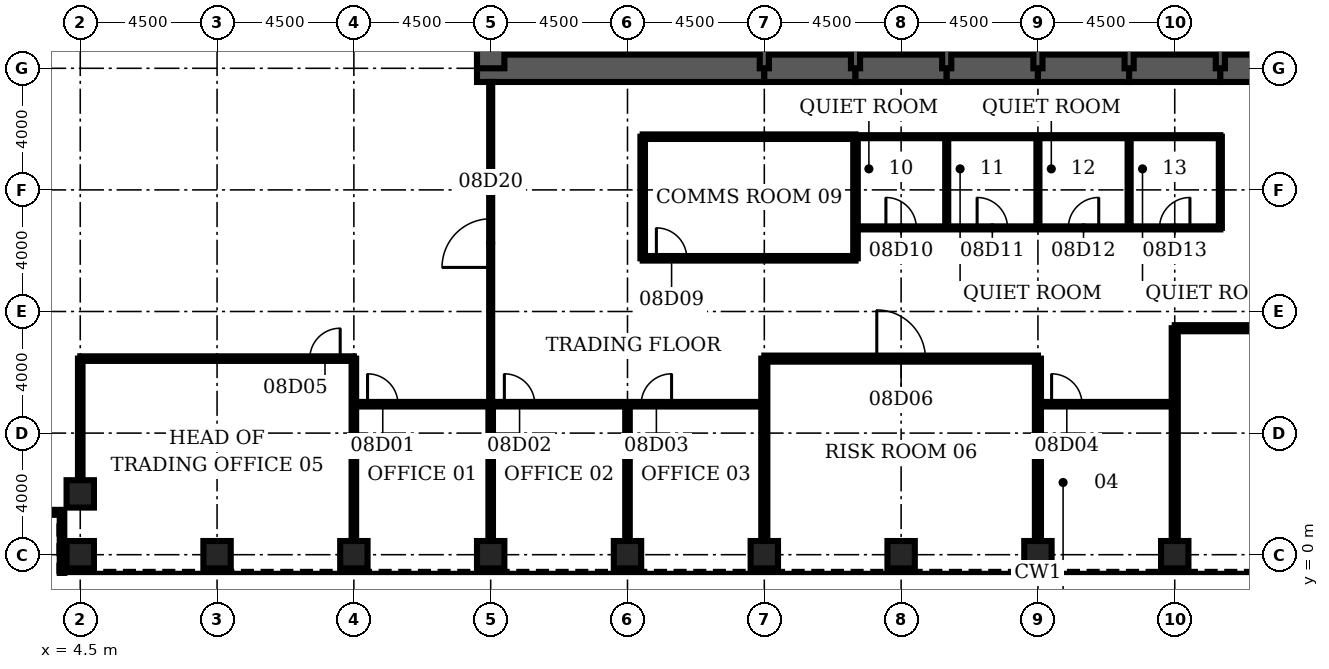
"""IFC4 building model, lengths in metres.
Left out: names, types, materials, properties, quantities, classifications, styles, units other than length and angle.
Written with IfcOpenShell. Run it as: python <this file> out.ifc"""

import sys

from ifc_helpers import new_model, si_unit, direction, frame, frame_2d, origin, origin_2d, place, context, subcontext, project, spatial, rectangle, hollow_rectangle, extrude, element, fill, save


model = new_model("IFC4")
c1 = context("Model", 3, precision=1e-05, world=origin(), true_north=direction((0.0, 1.0)))
c2 = subcontext(c1, "Body", "Model", "MODEL_VIEW")
j1 = project(units=[si_unit("LENGTHUNIT", "METRE"), si_unit("PLANEANGLEUNIT", "RADIAN")], contexts=[c1])
p1 = place(None, origin())
s1 = spatial("IfcSite", under=j1, at=p1, CompositionType="ELEMENT")
p2 = place(p1, origin())
s2 = spatial("IfcBuilding", under=s1, at=p2, CompositionType="ELEMENT")
p3 = place(p2, frame((0.0, 0.0, 41.0)))
s3 = spatial("IfcBuildingStorey", under=s2, at=p3, CompositionType="ELEMENT", Elevation=41.0)
for number, where, z_axis, x_axis in (
    (1, (4.5, 0.0, 0.0), (0.0, 0.0, 1.0), (0.0, 1.0, 0.0)),
    (2, (9.0, 0.0, 0.0), (0.0, 0.0, 1.0), (0.0, 1.0, 0.0)),
    (3, (13.5, 0.0, 0.0), (0.0, 0.0, 1.0), (0.0, 1.0, 0.0)),
    (4, (18.0, 0.0, 0.0), (0.0, 0.0, 1.0), (0.0, 1.0, 0.0)),
    (5, (22.5, 0.0, 0.0), (0.0, 0.0, 1.0), (0.0, 1.0, 0.0)),
    (6, (27.0, 0.0, 0.0), (0.0, 0.0, 1.0), (0.0, 1.0, 0.0)),
    (7, (31.5, 0.0, 0.0), (0.0, 0.0, 1.0), (0.0, 1.0, 0.0)),
    (8, (36.0, 0.0, 0.0), (0.0, 0.0, 1.0), (0.0, 1.0, 0.0)),
    (9, (40.5, 0.0, 0.0), (0.0, 0.0, 1.0), (0.0, 1.0, 0.0)),
    (10, (4.5, 2.0, 0.0), (0.0, 0.0, 1.0), (0.0, 1.0, 0.0)),
):
    element("IfcColumn", number, at=place(p3, frame(where, z_axis=z_axis, x_axis=x_axis)), inside=s3, PredefinedType="COLUMN", context=c2, shape_type="SweptSolid", body=[
        extrude(hollow_rectangle(XDim=0.9, YDim=0.9, WallThickness=0.12, at=origin_2d()), origin(), (0.0, 0.0, 1.0), 4.5),
    ])
p4 = place(p3, frame((17.55, 16.0, 0.0), z_axis=(0.0, 0.0, 1.0), x_axis=(1.0, 0.0, 0.0)))
e11 = element("IfcWall", 11, at=p4, inside=s3, PredefinedType="SHEAR", context=c2, shape_type="SweptSolid", body=[
    extrude(rectangle(XDim=9.45, YDim=0.9, at=frame_2d((4.725, 0.0))), origin(), (0.0, 0.0, 1.0), 4.5),
])
for number, where, z_axis, x_axis in (
    (12, (27.0, 16.0, 0.0), (0.0, 0.0, 1.0), (1.0, 0.0, 0.0)),
    (13, (30.0, 16.0, 0.0), (0.0, 0.0, 1.0), (1.0, 0.0, 0.0)),
    (14, (33.0, 16.0, 0.0), (0.0, 0.0, 1.0), (1.0, 0.0, 0.0)),
    (15, (36.0, 16.0, 0.0), (0.0, 0.0, 1.0), (1.0, 0.0, 0.0)),
    (16, (39.0, 16.0, 0.0), (0.0, 0.0, 1.0), (1.0, 0.0, 0.0)),
    (17, (42.0, 16.0, 0.0), (0.0, 0.0, 1.0), (1.0, 0.0, 0.0)),
):
    element("IfcWall", number, at=place(p3, frame(where, z_axis=z_axis, x_axis=x_axis)), inside=s3, PredefinedType="SHEAR", context=c2, shape_type="SweptSolid", body=[
        extrude(rectangle(XDim=3.0, YDim=0.9, at=frame_2d((1.5, 0.0))), origin(), (0.0, 0.0, 1.0), 4.5),
    ])
p5 = place(p3, frame((18.0, 19.2, 0.0), z_axis=(0.0, 0.0, 1.0), x_axis=(0.0, -1.0, 0.0)))
e18 = element("IfcWall", 18, at=p5, inside=s3, PredefinedType="SHEAR", context=c2, shape_type="SweptSolid", body=[
    extrude(rectangle(XDim=3.2, YDim=0.9, at=frame_2d((1.6, 0.0))), origin(), (0.0, 0.0, 1.0), 4.5),
])
for number, where, z_axis, x_axis in (
    (19, (27.0, 16.0, 0.0), (0.0, 0.0, 1.0), (0.0, 1.0, 0.0)),
    (20, (30.0, 16.0, 0.0), (0.0, 0.0, 1.0), (0.0, 1.0, 0.0)),
    (21, (33.0, 16.0, 0.0), (0.0, 0.0, 1.0), (0.0, 1.0, 0.0)),
    (22, (36.0, 16.0, 0.0), (0.0, 0.0, 1.0), (0.0, 1.0, 0.0)),
    (23, (39.0, 16.0, 0.0), (0.0, 0.0, 1.0), (0.0, 1.0, 0.0)),
    (24, (42.0, 16.0, 0.0), (0.0, 0.0, 1.0), (0.0, 1.0, 0.0)),
):
    element("IfcWall", number, at=place(p3, frame(where, z_axis=z_axis, x_axis=x_axis)), inside=s3, PredefinedType="SOLIDWALL", context=c2, shape_type="SweptSolid", body=[
        extrude(rectangle(XDim=3.2, YDim=0.3, at=frame_2d((1.6, 0.0))), origin(), (0.0, 0.0, 1.0), 4.5),
    ])
p6 = place(p3, frame((13.5, 4.95, 0.0), z_axis=(0.0, 0.0, 1.0), x_axis=(1.0, 0.0, 0.0)))
e25 = element("IfcWall", 25, at=p6, inside=s3, PredefinedType="PARTITIONING", context=c2, shape_type="SweptSolid", body=[
    extrude(rectangle(XDim=13.5, YDim=0.15, at=frame_2d((6.75, 0.0))), origin(), (0.0, 0.0, 1.0), 3.0),
])
p7 = place(p6, frame((0.45, 0.0, 0.0)))
e26 = element("IfcOpeningElement", 26, at=p7, cuts=e25, PredefinedType="OPENING", context=c2, shape_type="SweptSolid", body=[
    extrude(rectangle(XDim=1.0, YDim=2.1, at=frame_2d((0.5, 1.05))), frame((0.0, 0.085, 0.0), z_axis=(0.0, -1.0, 0.0), x_axis=(1.0, 0.0, 0.0)), (0.0, 0.0, 1.0), 0.17),
])
p8 = place(p6, frame((4.95, 0.0, 0.0)))
e27 = element("IfcOpeningElement", 27, at=p8, cuts=e25, PredefinedType="OPENING", context=c2, shape_type="SweptSolid", body=[
    extrude(rectangle(XDim=1.0, YDim=2.1, at=frame_2d((0.5, 1.05))), frame((0.0, 0.085, 0.0), z_axis=(0.0, -1.0, 0.0), x_axis=(1.0, 0.0, 0.0)), (0.0, 0.0, 1.0), 0.17),
])
p9 = place(p6, frame((9.45, 0.0, 0.0)))
e28 = element("IfcOpeningElement", 28, at=p9, cuts=e25, PredefinedType="OPENING", context=c2, shape_type="SweptSolid", body=[
    extrude(rectangle(XDim=1.0, YDim=2.1, at=frame_2d((0.5, 1.05))), frame((0.0, 0.085, 0.0), z_axis=(0.0, -1.0, 0.0), x_axis=(1.0, 0.0, 0.0)), (0.0, 0.0, 1.0), 0.17),
])
p10 = place(p3, frame((36.0, 4.95, 0.0), z_axis=(0.0, 0.0, 1.0), x_axis=(1.0, 0.0, 0.0)))
e29 = element("IfcWall", 29, at=p10, inside=s3, PredefinedType="PARTITIONING", context=c2, shape_type="SweptSolid", body=[
    extrude(rectangle(XDim=4.5, YDim=0.15, at=frame_2d((2.25, 0.0))), origin(), (0.0, 0.0, 1.0), 3.0),
])
p11 = place(p10, frame((0.45, 0.0, 0.0)))
e30 = element("IfcOpeningElement", 30, at=p11, cuts=e29, PredefinedType="OPENING", context=c2, shape_type="SweptSolid", body=[
    extrude(rectangle(XDim=1.0, YDim=2.1, at=frame_2d((0.5, 1.05))), frame((0.0, 0.085, 0.0), z_axis=(0.0, -1.0, 0.0), x_axis=(1.0, 0.0, 0.0)), (0.0, 0.0, 1.0), 0.17),
])
p12 = place(p3, frame((4.5, 6.45, 0.0), z_axis=(0.0, 0.0, 1.0), x_axis=(1.0, 0.0, 0.0)))
e31 = element("IfcWall", 31, at=p12, inside=s3, PredefinedType="PARTITIONING", context=c2, shape_type="SweptSolid", body=[
    extrude(rectangle(XDim=9.0, YDim=0.15, at=frame_2d((4.5, 0.0))), origin(), (0.0, 0.0, 1.0), 3.0),
])
p13 = place(p12, frame((7.55, 0.0, 0.0)))
e32 = element("IfcOpeningElement", 32, at=p13, cuts=e31, PredefinedType="OPENING", context=c2, shape_type="SweptSolid", body=[
    extrude(rectangle(XDim=1.0, YDim=2.1, at=frame_2d((0.5, 1.05))), frame((0.0, 0.085, 0.0), z_axis=(0.0, -1.0, 0.0), x_axis=(1.0, 0.0, 0.0)), (0.0, 0.0, 1.0), 0.17),
])
p14 = place(p3, frame((27.0, 6.45, 0.0), z_axis=(0.0, 0.0, 1.0), x_axis=(1.0, 0.0, 0.0)))
e33 = element("IfcWall", 33, at=p14, inside=s3, PredefinedType="PARTITIONING", context=c2, shape_type="SweptSolid", body=[
    extrude(rectangle(XDim=9.0, YDim=0.2, at=frame_2d((4.5, 0.0))), origin(), (0.0, 0.0, 1.0), 3.0),
])
p15 = place(p14, frame((3.7, 0.0, 0.0)))
e34 = element("IfcOpeningElement", 34, at=p15, cuts=e33, PredefinedType="OPENING", context=c2, shape_type="SweptSolid", body=[
    extrude(rectangle(XDim=1.6, YDim=2.1, at=frame_2d((0.8, 1.05))), frame((0.0, 0.11, 0.0), z_axis=(0.0, -1.0, 0.0), x_axis=(1.0, 0.0, 0.0)), (0.0, 0.0, 1.0), 0.22),
])
p16 = place(p3, frame((40.5, 7.45, 0.0), z_axis=(0.0, 0.0, 1.0), x_axis=(1.0, 0.0, 0.0)))
e35 = element("IfcWall", 35, at=p16, inside=s3, PredefinedType="PARTITIONING", context=c2, shape_type="SweptSolid", body=[
    extrude(rectangle(XDim=18.0, YDim=0.2, at=frame_2d((9.0, 0.0))), origin(), (0.0, 0.0, 1.0), 3.0),
])
p17 = place(p16, frame((8.2, 0.0, 0.0)))
e36 = element("IfcOpeningElement", 36, at=p17, cuts=e35, PredefinedType="OPENING", context=c2, shape_type="SweptSolid", body=[
    extrude(rectangle(XDim=1.6, YDim=2.1, at=frame_2d((0.8, 1.05))), frame((0.0, 0.11, 0.0), z_axis=(0.0, -1.0, 0.0), x_axis=(1.0, 0.0, 0.0)), (0.0, 0.0, 1.0), 0.22),
])
p18 = place(p3, frame((23.0, 9.75, 0.0), z_axis=(0.0, 0.0, 1.0), x_axis=(1.0, 0.0, 0.0)))
e37 = element("IfcWall", 37, at=p18, inside=s3, PredefinedType="PARTITIONING", context=c2, shape_type="SweptSolid", body=[
    extrude(rectangle(XDim=7.0, YDim=0.15, at=frame_2d((3.5, 0.0))), origin(), (0.0, 0.0, 1.0), 3.0),
])
p19 = place(p18, frame((0.45, 0.0, 0.0)))
e38 = element("IfcOpeningElement", 38, at=p19, cuts=e37, PredefinedType="OPENING", context=c2, shape_type="SweptSolid", body=[
    extrude(rectangle(XDim=1.0, YDim=2.1, at=frame_2d((0.5, 1.05))), frame((0.0, 0.085, 0.0), z_axis=(0.0, -1.0, 0.0), x_axis=(1.0, 0.0, 0.0)), (0.0, 0.0, 1.0), 0.17),
])
p20 = place(p3, frame((30.0, 10.75, 0.0), z_axis=(0.0, 0.0, 1.0), x_axis=(1.0, 0.0, 0.0)))
e39 = element("IfcWall", 39, at=p20, inside=s3, PredefinedType="PARTITIONING", context=c2, shape_type="SweptSolid", body=[
    extrude(rectangle(XDim=12.0, YDim=0.1, at=frame_2d((6.0, 0.0))), origin(), (0.0, 0.0, 1.0), 3.0),
])
p21 = place(p20, frame((1.0, 0.0, 0.0)))
e40 = element("IfcOpeningElement", 40, at=p21, cuts=e39, PredefinedType="OPENING", context=c2, shape_type="SweptSolid", body=[
    extrude(rectangle(XDim=1.0, YDim=2.1, at=frame_2d((0.5, 1.05))), frame((0.0, 0.06, 0.0), z_axis=(0.0, -1.0, 0.0), x_axis=(1.0, 0.0, 0.0)), (0.0, 0.0, 1.0), 0.12),
])
p22 = place(p20, frame((4.0, 0.0, 0.0)))
e41 = element("IfcOpeningElement", 41, at=p22, cuts=e39, PredefinedType="OPENING", context=c2, shape_type="SweptSolid", body=[
    extrude(rectangle(XDim=1.0, YDim=2.1, at=frame_2d((0.5, 1.05))), frame((0.0, 0.06, 0.0), z_axis=(0.0, -1.0, 0.0), x_axis=(1.0, 0.0, 0.0)), (0.0, 0.0, 1.0), 0.12),
])
p23 = place(p20, frame((7.0, 0.0, 0.0)))
e42 = element("IfcOpeningElement", 42, at=p23, cuts=e39, PredefinedType="OPENING", context=c2, shape_type="SweptSolid", body=[
    extrude(rectangle(XDim=1.0, YDim=2.1, at=frame_2d((0.5, 1.05))), frame((0.0, 0.06, 0.0), z_axis=(0.0, -1.0, 0.0), x_axis=(1.0, 0.0, 0.0)), (0.0, 0.0, 1.0), 0.12),
])
p24 = place(p20, frame((10.0, 0.0, 0.0)))
e43 = element("IfcOpeningElement", 43, at=p24, cuts=e39, PredefinedType="OPENING", context=c2, shape_type="SweptSolid", body=[
    extrude(rectangle(XDim=1.0, YDim=2.1, at=frame_2d((0.5, 1.05))), frame((0.0, 0.06, 0.0), z_axis=(0.0, -1.0, 0.0), x_axis=(1.0, 0.0, 0.0)), (0.0, 0.0, 1.0), 0.12),
])
p25 = place(p3, frame((23.0, 13.75, 0.0), z_axis=(0.0, 0.0, 1.0), x_axis=(1.0, 0.0, 0.0)))
e44 = element("IfcWall", 44, at=p25, inside=s3, PredefinedType="PARTITIONING", context=c2, shape_type="SweptSolid", body=[
    extrude(rectangle(XDim=7.0, YDim=0.15, at=frame_2d((3.5, 0.0))), origin(), (0.0, 0.0, 1.0), 3.0),
])
p26 = place(p3, frame((30.0, 13.75, 0.0), z_axis=(0.0, 0.0, 1.0), x_axis=(1.0, 0.0, 0.0)))
e45 = element("IfcWall", 45, at=p26, inside=s3, PredefinedType="PARTITIONING", context=c2, shape_type="SweptSolid", body=[
    extrude(rectangle(XDim=12.0, YDim=0.1, at=frame_2d((6.0, 0.0))), origin(), (0.0, 0.0, 1.0), 3.0),
])
p27 = place(p3, frame((4.5, 2.45, 0.0), z_axis=(0.0, 0.0, 1.0), x_axis=(0.0, 1.0, 0.0)))
e46 = element("IfcWall", 46, at=p27, inside=s3, PredefinedType="PARTITIONING", context=c2, shape_type="SweptSolid", body=[
    extrude(rectangle(XDim=4.0, YDim=0.15, at=frame_2d((2.0, 0.0))), origin(), (0.0, 0.0, 1.0), 3.0),
])
p28 = place(p3, frame((13.5, 0.45, 0.0), z_axis=(0.0, 0.0, 1.0), x_axis=(0.0, 1.0, 0.0)))
e47 = element("IfcWall", 47, at=p28, inside=s3, PredefinedType="PARTITIONING", context=c2, shape_type="SweptSolid", body=[
    extrude(rectangle(XDim=6.0, YDim=0.15, at=frame_2d((3.0, 0.0))), origin(), (0.0, 0.0, 1.0), 3.0),
])
p29 = place(p3, frame((18.0, 0.45, 0.0), z_axis=(0.0, 0.0, 1.0), x_axis=(0.0, 1.0, 0.0)))
e48 = element("IfcWall", 48, at=p29, inside=s3, PredefinedType="PARTITIONING", context=c2, shape_type="SweptSolid", body=[
    extrude(rectangle(XDim=4.5, YDim=0.15, at=frame_2d((2.25, 0.0))), origin(), (0.0, 0.0, 1.0), 3.0),
])
p30 = place(p3, frame((18.0, 4.95, 0.0), z_axis=(0.0, 0.0, 1.0), x_axis=(0.0, 1.0, 0.0)))
e49 = element("IfcWall", 49, at=p30, inside=s3, PredefinedType="PARTITIONING", context=c2, shape_type="SweptSolid", body=[
    extrude(rectangle(XDim=10.6, YDim=0.1, at=frame_2d((5.3, 0.0))), origin(), (0.0, 0.0, 1.0), 3.0),
])
p31 = place(p30, frame((4.5, 0.0, 0.0)))
e50 = element("IfcOpeningElement", 50, at=p31, cuts=e49, PredefinedType="OPENING", context=c2, shape_type="SweptSolid", body=[
    extrude(rectangle(XDim=1.6, YDim=2.1, at=frame_2d((0.8, 1.05))), frame((0.0, 0.06, 0.0), z_axis=(0.0, -1.0, 0.0), x_axis=(1.0, 0.0, 0.0)), (0.0, 0.0, 1.0), 0.12),
])
p32 = place(p3, frame((22.5, 0.45, 0.0), z_axis=(0.0, 0.0, 1.0), x_axis=(0.0, 1.0, 0.0)))
e51 = element("IfcWall", 51, at=p32, inside=s3, PredefinedType="PARTITIONING", context=c2, shape_type="SweptSolid", body=[
    extrude(rectangle(XDim=4.5, YDim=0.15, at=frame_2d((2.25, 0.0))), origin(), (0.0, 0.0, 1.0), 3.0),
])
p33 = place(p3, frame((23.0, 9.75, 0.0), z_axis=(0.0, 0.0, 1.0), x_axis=(0.0, 1.0, 0.0)))
e52 = element("IfcWall", 52, at=p33, inside=s3, PredefinedType="PARTITIONING", context=c2, shape_type="SweptSolid", body=[
    extrude(rectangle(XDim=4.0, YDim=0.15, at=frame_2d((2.0, 0.0))), origin(), (0.0, 0.0, 1.0), 3.0),
])
p34 = place(p3, frame((27.0, 0.45, 0.0), z_axis=(0.0, 0.0, 1.0), x_axis=(0.0, 1.0, 0.0)))
e53 = element("IfcWall", 53, at=p34, inside=s3, PredefinedType="PARTITIONING", context=c2, shape_type="SweptSolid", body=[
    extrude(rectangle(XDim=6.0, YDim=0.2, at=frame_2d((3.0, 0.0))), origin(), (0.0, 0.0, 1.0), 3.0),
])
p35 = place(p3, frame((30.0, 9.75, 0.0), z_axis=(0.0, 0.0, 1.0), x_axis=(0.0, 1.0, 0.0)))
e54 = element("IfcWall", 54, at=p35, inside=s3, PredefinedType="PARTITIONING", context=c2, shape_type="SweptSolid", body=[
    extrude(rectangle(XDim=4.0, YDim=0.15, at=frame_2d((2.0, 0.0))), origin(), (0.0, 0.0, 1.0), 3.0),
])
p36 = place(p3, frame((33.0, 10.75, 0.0), z_axis=(0.0, 0.0, 1.0), x_axis=(0.0, 1.0, 0.0)))
e55 = element("IfcWall", 55, at=p36, inside=s3, PredefinedType="PARTITIONING", context=c2, shape_type="SweptSolid", body=[
    extrude(rectangle(XDim=3.0, YDim=0.1, at=frame_2d((1.5, 0.0))), origin(), (0.0, 0.0, 1.0), 3.0),
])
p37 = place(p3, frame((36.0, 0.45, 0.0), z_axis=(0.0, 0.0, 1.0), x_axis=(0.0, 1.0, 0.0)))
e56 = element("IfcWall", 56, at=p37, inside=s3, PredefinedType="PARTITIONING", context=c2, shape_type="SweptSolid", body=[
    extrude(rectangle(XDim=6.0, YDim=0.2, at=frame_2d((3.0, 0.0))), origin(), (0.0, 0.0, 1.0), 3.0),
])
for number, where, z_axis, x_axis in (
    (57, (36.0, 10.75, 0.0), (0.0, 0.0, 1.0), (0.0, 1.0, 0.0)),
    (58, (39.0, 10.75, 0.0), (0.0, 0.0, 1.0), (0.0, 1.0, 0.0)),
):
    element("IfcWall", number, at=place(p3, frame(where, z_axis=z_axis, x_axis=x_axis)), inside=s3, PredefinedType="PARTITIONING", context=c2, shape_type="SweptSolid", body=[
        extrude(rectangle(XDim=3.0, YDim=0.1, at=frame_2d((1.5, 0.0))), origin(), (0.0, 0.0, 1.0), 3.0),
    ])
p38 = place(p3, frame((40.5, 0.45, 0.0), z_axis=(0.0, 0.0, 1.0), x_axis=(0.0, 1.0, 0.0)))
e59 = element("IfcWall", 59, at=p38, inside=s3, PredefinedType="PARTITIONING", context=c2, shape_type="SweptSolid", body=[
    extrude(rectangle(XDim=7.0, YDim=0.2, at=frame_2d((3.5, 0.0))), origin(), (0.0, 0.0, 1.0), 3.0),
])
p39 = place(p3, frame((42.0, 10.75, 0.0), z_axis=(0.0, 0.0, 1.0), x_axis=(0.0, 1.0, 0.0)))
e60 = element("IfcWall", 60, at=p39, inside=s3, PredefinedType="PARTITIONING", context=c2, shape_type="SweptSolid", body=[
    extrude(rectangle(XDim=3.0, YDim=0.1, at=frame_2d((1.5, 0.0))), origin(), (0.0, 0.0, 1.0), 3.0),
])
p40 = place(p3, frame((1.65, 1.4, 0.0), z_axis=(0.0, 0.0, 1.0), x_axis=(1.0, 0.0, 0.0)))
e61 = element("IfcWall", 61, at=p40, inside=s3, PredefinedType="ELEMENTEDWALL", context=c2, shape_type="SweptSolid", body=[
    extrude(rectangle(XDim=2.25, YDim=0.15, at=frame_2d((1.125, 0.0))), origin(), (0.0, 0.0, 1.0), 4.32),
])
p41 = place(p3, frame((3.9, 1.4, 0.0), z_axis=(0.0, 0.0, 1.0), x_axis=(0.0, -1.0, 0.0)))
e62 = element("IfcWall", 62, at=p41, inside=s3, PredefinedType="ELEMENTEDWALL", context=c2, shape_type="SweptSolid", body=[
    extrude(rectangle(XDim=2.0, YDim=0.15, at=frame_2d((1.0, 0.0))), origin(), (0.0, 0.0, 1.0), 4.32),
])
p42 = place(p7, origin())
e63 = element("IfcDoor", 63, at=p42, inside=s3, OperationType="SINGLE_SWING_LEFT", PredefinedType="DOOR", context=c2, shape_type="SweptSolid", body=[
    extrude(rectangle(XDim=1.0, YDim=2.1, at=frame_2d((0.5, 1.05))), frame((0.0, 0.025, 0.0), z_axis=(0.0, -1.0, 0.0), x_axis=(1.0, 0.0, 0.0)), (0.0, 0.0, 1.0), 0.05),
])
fill(e26, e63)
p43 = place(p8, origin())
e64 = element("IfcDoor", 64, at=p43, inside=s3, OperationType="SINGLE_SWING_LEFT", PredefinedType="DOOR", context=c2, shape_type="SweptSolid", body=[
    extrude(rectangle(XDim=1.0, YDim=2.1, at=frame_2d((0.5, 1.05))), frame((0.0, 0.025, 0.0), z_axis=(0.0, -1.0, 0.0), x_axis=(1.0, 0.0, 0.0)), (0.0, 0.0, 1.0), 0.05),
])
fill(e27, e64)
p44 = place(p9, origin())
e65 = element("IfcDoor", 65, at=p44, inside=s3, OperationType="SINGLE_SWING_RIGHT", PredefinedType="DOOR", context=c2, shape_type="SweptSolid", body=[
    extrude(rectangle(XDim=1.0, YDim=2.1, at=frame_2d((0.5, 1.05))), frame((0.0, 0.025, 0.0), z_axis=(0.0, -1.0, 0.0), x_axis=(1.0, 0.0, 0.0)), (0.0, 0.0, 1.0), 0.05),
])
fill(e28, e65)
p45 = place(p11, origin())
e66 = element("IfcDoor", 66, at=p45, inside=s3, OperationType="SINGLE_SWING_LEFT", PredefinedType="DOOR", context=c2, shape_type="SweptSolid", body=[
    extrude(rectangle(XDim=1.0, YDim=2.1, at=frame_2d((0.5, 1.05))), frame((0.0, 0.025, 0.0), z_axis=(0.0, -1.0, 0.0), x_axis=(1.0, 0.0, 0.0)), (0.0, 0.0, 1.0), 0.05),
])
fill(e30, e66)
p46 = place(p13, origin())
e67 = element("IfcDoor", 67, at=p46, inside=s3, OperationType="SINGLE_SWING_RIGHT", PredefinedType="DOOR", context=c2, shape_type="SweptSolid", body=[
    extrude(rectangle(XDim=1.0, YDim=2.1, at=frame_2d((0.5, 1.05))), frame((0.0, 0.025, 0.0), z_axis=(0.0, -1.0, 0.0), x_axis=(1.0, 0.0, 0.0)), (0.0, 0.0, 1.0), 0.05),
])
fill(e32, e67)
p47 = place(p15, origin())
e68 = element("IfcDoor", 68, at=p47, inside=s3, OperationType="SINGLE_SWING_LEFT", PredefinedType="DOOR", context=c2, shape_type="SweptSolid", body=[
    extrude(rectangle(XDim=1.6, YDim=2.1, at=frame_2d((0.8, 1.05))), frame((0.0, 0.025, 0.0), z_axis=(0.0, -1.0, 0.0), x_axis=(1.0, 0.0, 0.0)), (0.0, 0.0, 1.0), 0.05),
])
fill(e34, e68)
p48 = place(p19, origin())
e69 = element("IfcDoor", 69, at=p48, inside=s3, OperationType="SINGLE_SWING_LEFT", PredefinedType="DOOR", context=c2, shape_type="SweptSolid", body=[
    extrude(rectangle(XDim=1.0, YDim=2.1, at=frame_2d((0.5, 1.05))), frame((0.0, 0.025, 0.0), z_axis=(0.0, -1.0, 0.0), x_axis=(1.0, 0.0, 0.0)), (0.0, 0.0, 1.0), 0.05),
])
fill(e38, e69)
p49 = place(p21, origin())
e70 = element("IfcDoor", 70, at=p49, inside=s3, OperationType="SINGLE_SWING_LEFT", PredefinedType="DOOR", context=c2, shape_type="SweptSolid", body=[
    extrude(rectangle(XDim=1.0, YDim=2.1, at=frame_2d((0.5, 1.05))), frame((0.0, 0.025, 0.0), z_axis=(0.0, -1.0, 0.0), x_axis=(1.0, 0.0, 0.0)), (0.0, 0.0, 1.0), 0.05),
])
fill(e40, e70)
p50 = place(p22, origin())
e71 = element("IfcDoor", 71, at=p50, inside=s3, OperationType="SINGLE_SWING_LEFT", PredefinedType="DOOR", context=c2, shape_type="SweptSolid", body=[
    extrude(rectangle(XDim=1.0, YDim=2.1, at=frame_2d((0.5, 1.05))), frame((0.0, 0.025, 0.0), z_axis=(0.0, -1.0, 0.0), x_axis=(1.0, 0.0, 0.0)), (0.0, 0.0, 1.0), 0.05),
])
fill(e41, e71)
p51 = place(p23, origin())
e72 = element("IfcDoor", 72, at=p51, inside=s3, OperationType="SINGLE_SWING_RIGHT", PredefinedType="DOOR", context=c2, shape_type="SweptSolid", body=[
    extrude(rectangle(XDim=1.0, YDim=2.1, at=frame_2d((0.5, 1.05))), frame((0.0, 0.025, 0.0), z_axis=(0.0, -1.0, 0.0), x_axis=(1.0, 0.0, 0.0)), (0.0, 0.0, 1.0), 0.05),
])
fill(e42, e72)
p52 = place(p24, origin())
e73 = element("IfcDoor", 73, at=p52, inside=s3, OperationType="SINGLE_SWING_RIGHT", PredefinedType="DOOR", context=c2, shape_type="SweptSolid", body=[
    extrude(rectangle(XDim=1.0, YDim=2.1, at=frame_2d((0.5, 1.05))), frame((0.0, 0.025, 0.0), z_axis=(0.0, -1.0, 0.0), x_axis=(1.0, 0.0, 0.0)), (0.0, 0.0, 1.0), 0.05),
])
fill(e43, e73)
p53 = place(p31, origin())
e74 = element("IfcDoor", 74, at=p53, inside=s3, OperationType="SINGLE_SWING_LEFT", PredefinedType="DOOR", context=c2, shape_type="SweptSolid", body=[
    extrude(rectangle(XDim=1.6, YDim=2.1, at=frame_2d((0.8, 1.05))), frame((0.0, 0.025, 0.0), z_axis=(0.0, -1.0, 0.0), x_axis=(1.0, 0.0, 0.0)), (0.0, 0.0, 1.0), 0.05),
])
fill(e50, e74)
save(model, sys.argv[1])
